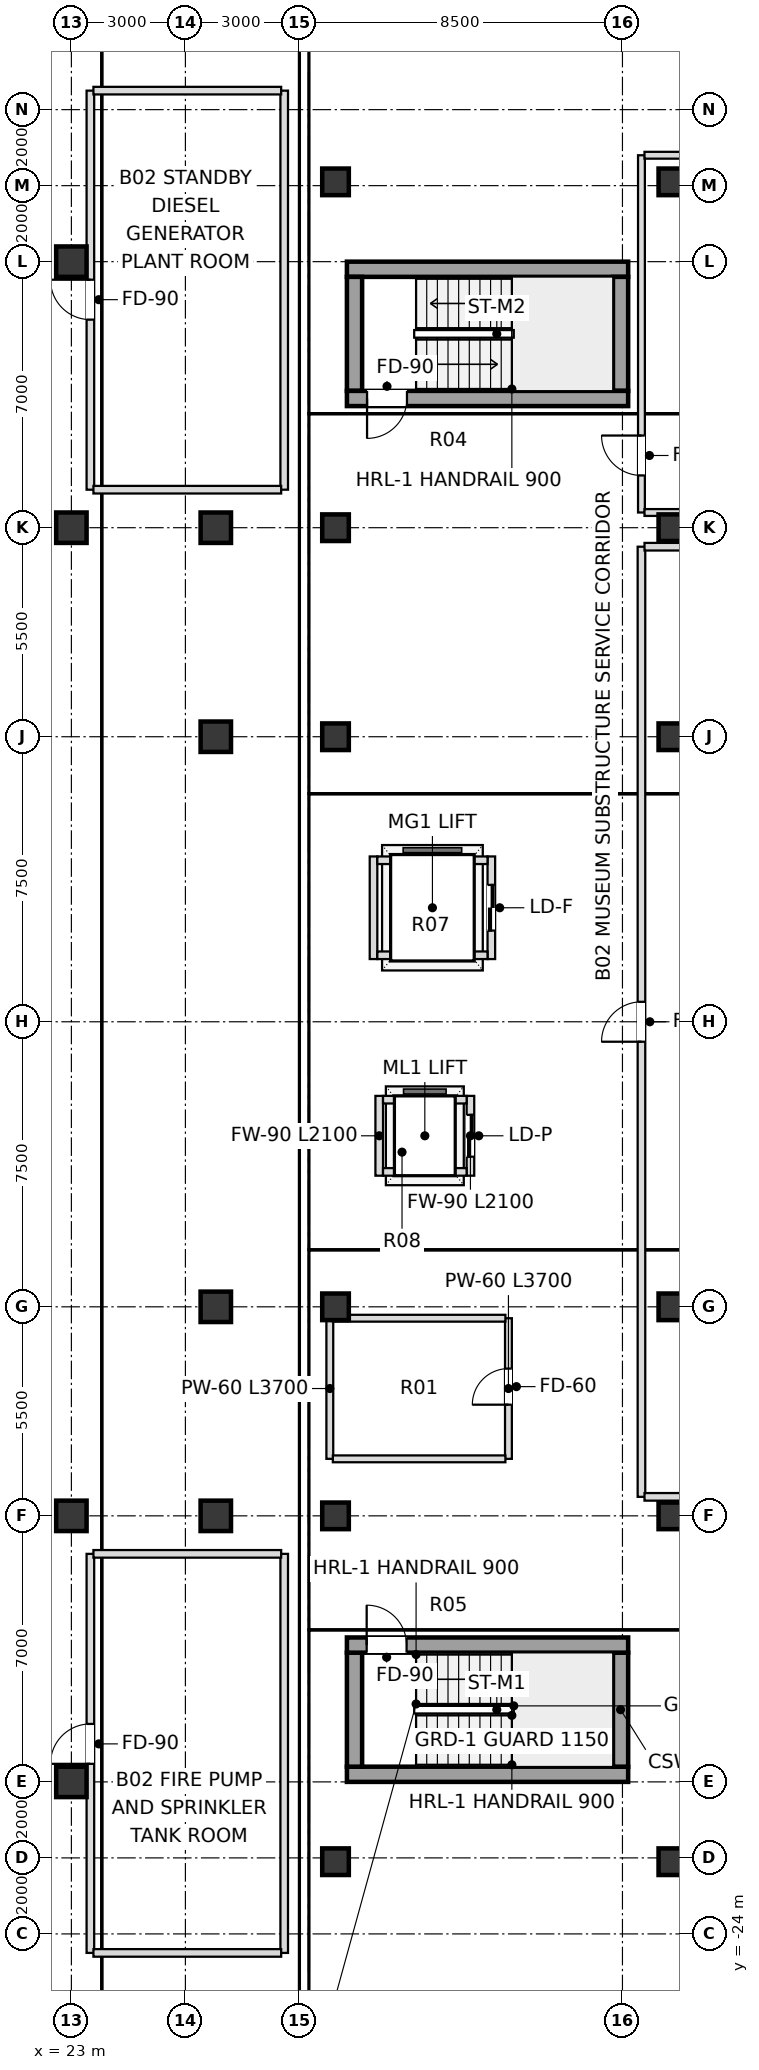
"""IFC4 building model, lengths in metres.
Left out: names, types, materials, properties, quantities, classifications, styles, units other than length and angle.
Written with IfcOpenShell. Run it as: python <this file> out.ifc"""

import sys

from ifc_helpers import new_model, si_unit, direction, frame, frame_2d, origin, origin_2d, place, context, subcontext, project, spatial, rectangle, extrude, element, fill, save


model = new_model("IFC4")
c1 = context("Model", 3, precision=1e-05, world=origin(), true_north=direction((0.0, 1.0)))
c2 = subcontext(c1, "Body", "Model", "MODEL_VIEW")
j1 = project(units=[si_unit("LENGTHUNIT", "METRE"), si_unit("PLANEANGLEUNIT", "RADIAN")], contexts=[c1])
p1 = place(None, origin())
s1 = spatial("IfcSite", under=j1, at=p1, CompositionType="ELEMENT")
p2 = place(p1, origin())
s2 = spatial("IfcBuilding", under=s1, at=p2, CompositionType="ELEMENT")
p3 = place(p2, frame((0.0, 0.0, -7.2)))
s3 = spatial("IfcBuildingStorey", under=s2, at=p3, CompositionType="ELEMENT", Elevation=-7.2)
for number, where, z_axis, x_axis in (
    (1, (23.0, -20.0, 0.0), (0.0, 0.0, 1.0), (1.0, 0.0, 0.0)),
    (2, (23.0, -13.0, 0.0), (0.0, 0.0, 1.0), (1.0, 0.0, 0.0)),
    (3, (23.0, 13.0, 0.0), (0.0, 0.0, 1.0), (1.0, 0.0, 0.0)),
    (4, (23.0, 20.0, 0.0), (0.0, 0.0, 1.0), (1.0, 0.0, 0.0)),
    (5, (26.8, -13.0, 0.0), (0.0, 0.0, 1.0), (1.0, 0.0, 0.0)),
    (6, (26.8, -7.5, 0.0), (0.0, 0.0, 1.0), (1.0, 0.0, 0.0)),
    (7, (26.8, 7.5, 0.0), (0.0, 0.0, 1.0), (1.0, 0.0, 0.0)),
    (8, (26.8, 13.0, 0.0), (0.0, 0.0, 1.0), (1.0, 0.0, 0.0)),
):
    element("IfcColumn", number, at=place(p3, frame(where, z_axis=z_axis, x_axis=x_axis)), inside=s3, PredefinedType="COLUMN", context=c2, shape_type="SweptSolid", body=[
        extrude(rectangle(XDim=0.8, YDim=0.8, at=origin_2d()), origin(), (0.0, 0.0, 1.0), 3.6),
    ])
for number, where, z_axis, x_axis in (
    (9, (29.95, -22.1, 0.0), (0.0, 0.0, 1.0), (1.0, 0.0, 0.0)),
    (10, (29.95, -13.0, 0.0), (0.0, 0.0, 1.0), (1.0, 0.0, 0.0)),
    (11, (29.95, -7.5, 0.0), (0.0, 0.0, 1.0), (1.0, 0.0, 0.0)),
    (12, (29.95, 7.5, 0.0), (0.0, 0.0, 1.0), (1.0, 0.0, 0.0)),
    (13, (29.95, 13.0, 0.0), (0.0, 0.0, 1.0), (1.0, 0.0, 0.0)),
    (14, (29.95, 22.1, 0.0), (0.0, 0.0, 1.0), (1.0, 0.0, 0.0)),
    (15, (38.8, -22.1, 0.0), (0.0, 0.0, 1.0), (1.0, 0.0, 0.0)),
    (16, (38.8, -13.0, 0.0), (0.0, 0.0, 1.0), (1.0, 0.0, 0.0)),
    (17, (38.8, -7.5, 0.0), (0.0, 0.0, 1.0), (1.0, 0.0, 0.0)),
    (18, (38.8, 7.5, 0.0), (0.0, 0.0, 1.0), (1.0, 0.0, 0.0)),
    (19, (38.8, 13.0, 0.0), (0.0, 0.0, 1.0), (1.0, 0.0, 0.0)),
    (20, (38.8, 22.1, 0.0), (0.0, 0.0, 1.0), (1.0, 0.0, 0.0)),
):
    element("IfcColumn", number, at=place(p3, frame(where, z_axis=z_axis, x_axis=x_axis)), inside=s3, PredefinedType="COLUMN", context=c2, shape_type="SweptSolid", body=[
        extrude(rectangle(XDim=0.7, YDim=0.7, at=origin_2d()), origin(), (0.0, 0.0, 1.0), 3.6),
    ])
p4 = place(p3, frame((37.65, -19.8, 0.0), z_axis=(0.0, 0.0, 1.0), x_axis=(-1.0, 0.0, 0.0)))
e21 = element("IfcWall", 21, at=p4, inside=s3, PredefinedType="SHEAR", context=c2, shape_type="SweptSolid", body=[
    extrude(rectangle(XDim=7.4, YDim=0.4, at=frame_2d((3.7, 0.0))), origin(), (0.0, 0.0, 1.0), 3.3),
])
for number, where, z_axis, x_axis in (
    (22, (37.45, -19.6, 0.0), (0.0, 0.0, 1.0), (0.0, 1.0, 0.0)),
    (23, (30.45, -19.6, 0.0), (0.0, 0.0, 1.0), (0.0, 1.0, 0.0)),
):
    element("IfcWall", number, at=place(p3, frame(where, z_axis=z_axis, x_axis=x_axis)), inside=s3, PredefinedType="SHEAR", context=c2, shape_type="SweptSolid", body=[
        extrude(rectangle(XDim=3.0, YDim=0.4, at=frame_2d((1.5, 0.0))), origin(), (0.0, 0.0, 1.0), 3.3),
    ])
p5 = place(p3, frame((30.25, -16.4, 0.0), z_axis=(0.0, 0.0, 1.0), x_axis=(1.0, 0.0, 0.0)))
e24 = element("IfcWall", 24, at=p5, inside=s3, PredefinedType="SHEAR", context=c2, shape_type="SweptSolid", body=[
    extrude(rectangle(XDim=7.4, YDim=0.4, at=frame_2d((3.7, 0.0))), origin(), (0.0, 0.0, 1.0), 3.3),
])
p6 = place(p5, frame((0.52, 0.0, 0.0)))
e25 = element("IfcOpeningElement", 25, at=p6, cuts=e24, PredefinedType="OPENING", context=c2, shape_type="SweptSolid", body=[
    extrude(rectangle(XDim=1.05, YDim=2.15, at=frame_2d((0.525, 1.075))), frame((0.0, 0.21, 0.0), z_axis=(0.0, -1.0, 0.0), x_axis=(1.0, 0.0, 0.0)), (0.0, 0.0, 1.0), 0.42),
])
p7 = place(p3, frame((30.25, 19.8, 0.0), z_axis=(0.0, 0.0, 1.0), x_axis=(1.0, 0.0, 0.0)))
e26 = element("IfcWall", 26, at=p7, inside=s3, PredefinedType="SHEAR", context=c2, shape_type="SweptSolid", body=[
    extrude(rectangle(XDim=7.4, YDim=0.4, at=frame_2d((3.7, 0.0))), origin(), (0.0, 0.0, 1.0), 3.3),
])
for number, where, z_axis, x_axis in (
    (27, (37.45, 16.6, 0.0), (0.0, 0.0, 1.0), (0.0, 1.0, 0.0)),
    (28, (30.45, 16.6, 0.0), (0.0, 0.0, 1.0), (0.0, 1.0, 0.0)),
):
    element("IfcWall", number, at=place(p3, frame(where, z_axis=z_axis, x_axis=x_axis)), inside=s3, PredefinedType="SHEAR", context=c2, shape_type="SweptSolid", body=[
        extrude(rectangle(XDim=3.0, YDim=0.4, at=frame_2d((1.5, 0.0))), origin(), (0.0, 0.0, 1.0), 3.3),
    ])
p8 = place(p3, frame((37.65, 16.4, 0.0), z_axis=(0.0, 0.0, 1.0), x_axis=(-1.0, 0.0, 0.0)))
e29 = element("IfcWall", 29, at=p8, inside=s3, PredefinedType="SHEAR", context=c2, shape_type="SweptSolid", body=[
    extrude(rectangle(XDim=7.4, YDim=0.4, at=frame_2d((3.7, 0.0))), origin(), (0.0, 0.0, 1.0), 3.3),
])
p9 = place(p8, frame((5.82, 0.0, 0.0)))
e30 = element("IfcOpeningElement", 30, at=p9, cuts=e29, PredefinedType="OPENING", context=c2, shape_type="SweptSolid", body=[
    extrude(rectangle(XDim=1.05, YDim=2.15, at=frame_2d((0.525, 1.075))), frame((0.0, 0.21, 0.0), z_axis=(0.0, -1.0, 0.0), x_axis=(1.0, 0.0, 0.0)), (0.0, 0.0, 1.0), 0.42),
])
p10 = place(p3, frame((33.5, -4.05, 0.0), z_axis=(0.0, 0.0, 1.0), x_axis=(0.0, 1.0, 0.0)))
e31 = element("IfcWall", 31, at=p10, inside=s3, PredefinedType="SOLIDWALL", context=c2, shape_type="SweptSolid", body=[
    extrude(rectangle(XDim=2.1, YDim=0.2, at=frame_2d((1.05, 0.0))), origin(), (0.0, 0.0, 1.0), 2.517),
])
p11 = place(p10, frame((0.5, 0.0, 0.0)))
e32 = element("IfcOpeningElement", 32, at=p11, cuts=e31, PredefinedType="OPENING", context=c2, shape_type="SweptSolid", body=[
    extrude(rectangle(XDim=1.1, YDim=2.15, at=frame_2d((0.55, 1.075))), frame((0.0, 0.11, 0.0), z_axis=(0.0, -1.0, 0.0), x_axis=(1.0, 0.0, 0.0)), (0.0, 0.0, 1.0), 0.22),
])
p12 = place(p3, frame((31.1, -4.05, 0.0), z_axis=(0.0, 0.0, 1.0), x_axis=(0.0, 1.0, 0.0)))
e33 = element("IfcWall", 33, at=p12, inside=s3, PredefinedType="SOLIDWALL", context=c2, shape_type="SweptSolid", body=[
    extrude(rectangle(XDim=2.1, YDim=0.2, at=frame_2d((1.05, 0.0))), origin(), (0.0, 0.0, 1.0), 2.517),
])
for number, where, z_axis, x_axis in (
    (34, (31.2, -3.95, 0.0), (0.0, 0.0, 1.0), (1.0, 0.0, 0.0)),
    (35, (31.2, -2.05, 0.0), (0.0, 0.0, 1.0), (1.0, 0.0, 0.0)),
):
    element("IfcWall", number, at=place(p3, frame(where, z_axis=z_axis, x_axis=x_axis)), inside=s3, PredefinedType="SOLIDWALL", context=c2, shape_type="SweptSolid", body=[
        extrude(rectangle(XDim=2.2, YDim=0.2, at=frame_2d((1.1, 0.0))), origin(), (0.0, 0.0, 1.0), 2.517),
    ])
p13 = place(p3, frame((34.05, 1.65, 0.0), z_axis=(0.0, 0.0, 1.0), x_axis=(0.0, 1.0, 0.0)))
e36 = element("IfcWall", 36, at=p13, inside=s3, PredefinedType="SOLIDWALL", context=c2, shape_type="SweptSolid", body=[
    extrude(rectangle(XDim=2.7, YDim=0.2, at=frame_2d((1.35, 0.0))), origin(), (0.0, 0.0, 1.0), 2.517),
])
p14 = place(p13, frame((0.75, 0.0, 0.0)))
e37 = element("IfcOpeningElement", 37, at=p14, cuts=e36, PredefinedType="OPENING", context=c2, shape_type="SweptSolid", body=[
    extrude(rectangle(XDim=1.2, YDim=2.2, at=frame_2d((0.6, 1.1))), frame((0.0, 0.11, 0.0), z_axis=(0.0, -1.0, 0.0), x_axis=(1.0, 0.0, 0.0)), (0.0, 0.0, 1.0), 0.22),
])
p15 = place(p3, frame((30.95, 1.65, 0.0), z_axis=(0.0, 0.0, 1.0), x_axis=(0.0, 1.0, 0.0)))
e38 = element("IfcWall", 38, at=p15, inside=s3, PredefinedType="SOLIDWALL", context=c2, shape_type="SweptSolid", body=[
    extrude(rectangle(XDim=2.7, YDim=0.2, at=frame_2d((1.35, 0.0))), origin(), (0.0, 0.0, 1.0), 2.517),
])
for number, where, z_axis, x_axis in (
    (39, (31.05, 1.75, 0.0), (0.0, 0.0, 1.0), (1.0, 0.0, 0.0)),
    (40, (31.05, 4.25, 0.0), (0.0, 0.0, 1.0), (1.0, 0.0, 0.0)),
):
    element("IfcWall", number, at=place(p3, frame(where, z_axis=z_axis, x_axis=x_axis)), inside=s3, PredefinedType="SOLIDWALL", context=c2, shape_type="SweptSolid", body=[
        extrude(rectangle(XDim=2.9, YDim=0.2, at=frame_2d((1.45, 0.0))), origin(), (0.0, 0.0, 1.0), 2.517),
    ])
p16 = place(p3, frame((23.5, -24.5, 0.0), z_axis=(0.0, 0.0, 1.0), x_axis=(0.0, 1.0, 0.0)))
e41 = element("IfcWall", 41, at=p16, inside=s3, PredefinedType="SOLIDWALL", context=c2, shape_type="SweptSolid", body=[
    extrude(rectangle(XDim=10.5, YDim=0.2, at=frame_2d((5.25, 0.0))), origin(), (0.0, 0.0, 1.0), 3.3),
])
p17 = place(p16, frame((4.975, 0.0, 0.0)))
e42 = element("IfcOpeningElement", 42, at=p17, cuts=e41, PredefinedType="OPENING", context=c2, shape_type="SweptSolid", body=[
    extrude(rectangle(XDim=1.05, YDim=2.15, at=frame_2d((0.525, 1.075))), frame((0.0, 0.11, 0.0), z_axis=(0.0, -1.0, 0.0), x_axis=(1.0, 0.0, 0.0)), (0.0, 0.0, 1.0), 0.22),
])
p18 = place(p3, frame((23.5, 14.0, 0.0), z_axis=(0.0, 0.0, 1.0), x_axis=(0.0, 1.0, 0.0)))
e43 = element("IfcWall", 43, at=p18, inside=s3, PredefinedType="SOLIDWALL", context=c2, shape_type="SweptSolid", body=[
    extrude(rectangle(XDim=10.5, YDim=0.2, at=frame_2d((5.25, 0.0))), origin(), (0.0, 0.0, 1.0), 3.3),
])
p19 = place(p18, frame((4.475, 0.0, 0.0)))
e44 = element("IfcOpeningElement", 44, at=p19, cuts=e43, PredefinedType="OPENING", context=c2, shape_type="SweptSolid", body=[
    extrude(rectangle(XDim=1.05, YDim=2.15, at=frame_2d((0.525, 1.075))), frame((0.0, 0.11, 0.0), z_axis=(0.0, -1.0, 0.0), x_axis=(1.0, 0.0, 0.0)), (0.0, 0.0, 1.0), 0.22),
])
for number, where, z_axis, x_axis in (
    (45, (28.6, -24.5, 0.0), (0.0, 0.0, 1.0), (0.0, 1.0, 0.0)),
    (46, (28.6, 14.0, 0.0), (0.0, 0.0, 1.0), (0.0, 1.0, 0.0)),
):
    element("IfcWall", number, at=place(p3, frame(where, z_axis=z_axis, x_axis=x_axis)), inside=s3, PredefinedType="SOLIDWALL", context=c2, shape_type="SweptSolid", body=[
        extrude(rectangle(XDim=10.5, YDim=0.2, at=frame_2d((5.25, 0.0))), origin(), (0.0, 0.0, 1.0), 3.3),
    ])
p20 = place(p3, frame((29.8, -11.5, 0.0), z_axis=(0.0, 0.0, 1.0), x_axis=(0.0, 1.0, 0.0)))
e47 = element("IfcWall", 47, at=p20, inside=s3, PredefinedType="PARTITIONING", context=c2, shape_type="SweptSolid", body=[
    extrude(rectangle(XDim=3.7, YDim=0.18, at=frame_2d((1.85, 0.0))), origin(), (0.0, 0.0, 1.0), 2.517),
])
p21 = place(p3, frame((34.5, -11.5, 0.0), z_axis=(0.0, 0.0, 1.0), x_axis=(0.0, 1.0, 0.0)))
e48 = element("IfcWall", 48, at=p21, inside=s3, PredefinedType="PARTITIONING", context=c2, shape_type="SweptSolid", body=[
    extrude(rectangle(XDim=3.7, YDim=0.18, at=frame_2d((1.85, 0.0))), origin(), (0.0, 0.0, 1.0), 3.3),
])
p22 = place(p21, frame((1.425, 0.0, 0.0)))
e49 = element("IfcOpeningElement", 49, at=p22, cuts=e48, PredefinedType="OPENING", context=c2, shape_type="SweptSolid", body=[
    extrude(rectangle(XDim=0.95, YDim=2.15, at=frame_2d((0.475, 1.075))), frame((0.0, 0.1, 0.0), z_axis=(0.0, -1.0, 0.0), x_axis=(1.0, 0.0, 0.0)), (0.0, 0.0, 1.0), 0.2),
])
p23 = place(p3, frame((38.0, -12.5, 0.0), z_axis=(0.0, 0.0, 1.0), x_axis=(0.0, 1.0, 0.0)))
e50 = element("IfcWall", 50, at=p23, inside=s3, PredefinedType="SOLIDWALL", context=c2, shape_type="SweptSolid", body=[
    extrude(rectangle(XDim=25.0, YDim=0.2, at=frame_2d((12.5, 0.0))), origin(), (0.0, 0.0, 1.0), 2.517),
])
p24 = place(p23, frame((11.975, 0.0, 0.0)))
e51 = element("IfcOpeningElement", 51, at=p24, cuts=e50, PredefinedType="OPENING", context=c2, shape_type="SweptSolid", body=[
    extrude(rectangle(XDim=1.05, YDim=2.15, at=frame_2d((0.525, 1.075))), frame((0.0, 0.11, 0.0), z_axis=(0.0, -1.0, 0.0), x_axis=(1.0, 0.0, 0.0)), (0.0, 0.0, 1.0), 0.22),
])
p25 = place(p3, frame((38.0, 13.4, 0.0), z_axis=(0.0, 0.0, 1.0), x_axis=(0.0, 1.0, 0.0)))
e52 = element("IfcWall", 52, at=p25, inside=s3, PredefinedType="PARTITIONING", context=c2, shape_type="SweptSolid", body=[
    extrude(rectangle(XDim=9.4, YDim=0.18, at=frame_2d((4.7, 0.0))), origin(), (0.0, 0.0, 1.0), 2.517),
])
p26 = place(p25, frame((0.975, 0.0, 0.0)))
e53 = element("IfcOpeningElement", 53, at=p26, cuts=e52, PredefinedType="OPENING", context=c2, shape_type="SweptSolid", body=[
    extrude(rectangle(XDim=1.05, YDim=2.15, at=frame_2d((0.525, 1.075))), frame((0.0, 0.1, 0.0), z_axis=(0.0, -1.0, 0.0), x_axis=(1.0, 0.0, 0.0)), (0.0, 0.0, 1.0), 0.2),
])
for number, where, z_axis, x_axis in (
    (54, (23.58, -24.5, 0.0), (0.0, 0.0, 1.0), (1.0, 0.0, 0.0)),
    (55, (23.58, -14.0, 0.0), (0.0, 0.0, 1.0), (1.0, 0.0, 0.0)),
):
    element("IfcWall", number, at=place(p3, frame(where, z_axis=z_axis, x_axis=x_axis)), inside=s3, PredefinedType="SOLIDWALL", context=c2, shape_type="SweptSolid", body=[
        extrude(rectangle(XDim=4.94, YDim=0.2, at=frame_2d((2.47, 0.0))), origin(), (0.0, 0.0, 1.0), 3.3),
    ])
p27 = place(p3, frame((38.08, -12.5, 0.0), z_axis=(0.0, 0.0, 1.0), x_axis=(1.0, 0.0, 0.0)))
e56 = element("IfcWall", 56, at=p27, inside=s3, PredefinedType="SOLIDWALL", context=c2, shape_type="SweptSolid", body=[
    extrude(rectangle(XDim=16.84, YDim=0.2, at=frame_2d((8.42, 0.0))), origin(), (0.0, 0.0, 1.0), 2.517),
])
for number, where, z_axis, x_axis in (
    (57, (29.88, -11.5, 0.0), (0.0, 0.0, 1.0), (1.0, 0.0, 0.0)),
    (58, (29.88, -7.8, 0.0), (0.0, 0.0, 1.0), (1.0, 0.0, 0.0)),
):
    element("IfcWall", number, at=place(p3, frame(where, z_axis=z_axis, x_axis=x_axis)), inside=s3, PredefinedType="PARTITIONING", context=c2, shape_type="SweptSolid", body=[
        extrude(rectangle(XDim=4.54, YDim=0.18, at=frame_2d((2.27, 0.0))), origin(), (0.0, 0.0, 1.0), 2.517),
    ])
p28 = place(p3, frame((38.08, 12.5, 0.0), z_axis=(0.0, 0.0, 1.0), x_axis=(1.0, 0.0, 0.0)))
e59 = element("IfcWall", 59, at=p28, inside=s3, PredefinedType="SOLIDWALL", context=c2, shape_type="SweptSolid", body=[
    extrude(rectangle(XDim=16.84, YDim=0.2, at=frame_2d((8.42, 0.0))), origin(), (0.0, 0.0, 1.0), 2.517),
])
p29 = place(p3, frame((38.08, 13.4, 0.0), z_axis=(0.0, 0.0, 1.0), x_axis=(1.0, 0.0, 0.0)))
e60 = element("IfcWall", 60, at=p29, inside=s3, PredefinedType="PARTITIONING", context=c2, shape_type="SweptSolid", body=[
    extrude(rectangle(XDim=16.84, YDim=0.18, at=frame_2d((8.42, 0.0))), origin(), (0.0, 0.0, 1.0), 2.517),
])
p30 = place(p3, frame((23.58, 14.0, 0.0), z_axis=(0.0, 0.0, 1.0), x_axis=(1.0, 0.0, 0.0)))
e61 = element("IfcWall", 61, at=p30, inside=s3, PredefinedType="SOLIDWALL", context=c2, shape_type="SweptSolid", body=[
    extrude(rectangle(XDim=4.94, YDim=0.2, at=frame_2d((2.47, 0.0))), origin(), (0.0, 0.0, 1.0), 3.3),
])
p31 = place(p3, frame((38.08, 22.8, 0.0), z_axis=(0.0, 0.0, 1.0), x_axis=(1.0, 0.0, 0.0)))
e62 = element("IfcWall", 62, at=p31, inside=s3, PredefinedType="PARTITIONING", context=c2, shape_type="SweptSolid", body=[
    extrude(rectangle(XDim=16.84, YDim=0.18, at=frame_2d((8.42, 0.0))), origin(), (0.0, 0.0, 1.0), 3.3),
])
p32 = place(p3, frame((23.58, 24.5, 0.0), z_axis=(0.0, 0.0, 1.0), x_axis=(1.0, 0.0, 0.0)))
e63 = element("IfcWall", 63, at=p32, inside=s3, PredefinedType="SOLIDWALL", context=c2, shape_type="SweptSolid", body=[
    extrude(rectangle(XDim=4.94, YDim=0.2, at=frame_2d((2.47, 0.0))), origin(), (0.0, 0.0, 1.0), 3.3),
])
p33 = place(p6, origin())
e64 = element("IfcDoor", 64, at=p33, inside=s3, OperationType="SINGLE_SWING_LEFT", PredefinedType="DOOR", context=c2, shape_type="SweptSolid", body=[
    extrude(rectangle(XDim=1.05, YDim=2.15, at=frame_2d((0.525, 1.075))), frame((0.0, 0.025, 0.0), z_axis=(0.0, -1.0, 0.0), x_axis=(1.0, 0.0, 0.0)), (0.0, 0.0, 1.0), 0.05),
])
fill(e25, e64)
p34 = place(p9, origin())
e65 = element("IfcDoor", 65, at=p34, inside=s3, OperationType="SINGLE_SWING_RIGHT", PredefinedType="DOOR", context=c2, shape_type="SweptSolid", body=[
    extrude(rectangle(XDim=1.05, YDim=2.15, at=frame_2d((0.525, 1.075))), frame((0.0, 0.025, 0.0), z_axis=(0.0, -1.0, 0.0), x_axis=(1.0, 0.0, 0.0)), (0.0, 0.0, 1.0), 0.05),
])
fill(e30, e65)
p35 = place(p11, origin())
e66 = element("IfcDoor", 66, at=p35, inside=s3, OperationType="DOUBLE_DOOR_SLIDING", PredefinedType="DOOR", context=c2, shape_type="SweptSolid", body=[
    extrude(rectangle(XDim=1.1, YDim=2.15, at=frame_2d((0.55, 1.075))), frame((0.0, 0.025, 0.0), z_axis=(0.0, -1.0, 0.0), x_axis=(1.0, 0.0, 0.0)), (0.0, 0.0, 1.0), 0.05),
])
fill(e32, e66)
p36 = place(p14, origin())
e67 = element("IfcDoor", 67, at=p36, inside=s3, OperationType="DOUBLE_DOOR_SLIDING", PredefinedType="DOOR", context=c2, shape_type="SweptSolid", body=[
    extrude(rectangle(XDim=1.2, YDim=2.2, at=frame_2d((0.6, 1.1))), frame((0.0, 0.025, 0.0), z_axis=(0.0, -1.0, 0.0), x_axis=(1.0, 0.0, 0.0)), (0.0, 0.0, 1.0), 0.05),
])
fill(e37, e67)
p37 = place(p17, origin())
e68 = element("IfcDoor", 68, at=p37, inside=s3, OperationType="SINGLE_SWING_LEFT", PredefinedType="DOOR", context=c2, shape_type="SweptSolid", body=[
    extrude(rectangle(XDim=1.05, YDim=2.15, at=frame_2d((0.525, 1.075))), frame((0.0, 0.025, 0.0), z_axis=(0.0, -1.0, 0.0), x_axis=(1.0, 0.0, 0.0)), (0.0, 0.0, 1.0), 0.05),
])
fill(e42, e68)
p38 = place(p19, origin())
e69 = element("IfcDoor", 69, at=p38, inside=s3, OperationType="SINGLE_SWING_RIGHT", PredefinedType="DOOR", context=c2, shape_type="SweptSolid", body=[
    extrude(rectangle(XDim=1.05, YDim=2.15, at=frame_2d((0.525, 1.075))), frame((0.0, 0.025, 0.0), z_axis=(0.0, -1.0, 0.0), x_axis=(1.0, 0.0, 0.0)), (0.0, 0.0, 1.0), 0.05),
])
fill(e44, e69)
p39 = place(p24, origin())
e70 = element("IfcDoor", 70, at=p39, inside=s3, OperationType="SINGLE_SWING_LEFT", PredefinedType="DOOR", context=c2, shape_type="SweptSolid", body=[
    extrude(rectangle(XDim=1.05, YDim=2.15, at=frame_2d((0.525, 1.075))), frame((0.0, 0.025, 0.0), z_axis=(0.0, -1.0, 0.0), x_axis=(1.0, 0.0, 0.0)), (0.0, 0.0, 1.0), 0.05),
])
fill(e51, e70)
p40 = place(p26, origin())
e71 = element("IfcDoor", 71, at=p40, inside=s3, OperationType="SINGLE_SWING_RIGHT", PredefinedType="DOOR", context=c2, shape_type="SweptSolid", body=[
    extrude(rectangle(XDim=1.05, YDim=2.15, at=frame_2d((0.525, 1.075))), frame((0.0, 0.025, 0.0), z_axis=(0.0, -1.0, 0.0), x_axis=(1.0, 0.0, 0.0)), (0.0, 0.0, 1.0), 0.05),
])
fill(e53, e71)
p41 = place(p22, origin())
e72 = element("IfcDoor", 72, at=p41, inside=s3, OperationType="SINGLE_SWING_LEFT", PredefinedType="DOOR", context=c2, shape_type="SweptSolid", body=[
    extrude(rectangle(XDim=0.95, YDim=2.15, at=frame_2d((0.475, 1.075))), frame((0.0, 0.025, 0.0), z_axis=(0.0, -1.0, 0.0), x_axis=(1.0, 0.0, 0.0)), (0.0, 0.0, 1.0), 0.05),
])
fill(e49, e72)
save(model, sys.argv[1])
